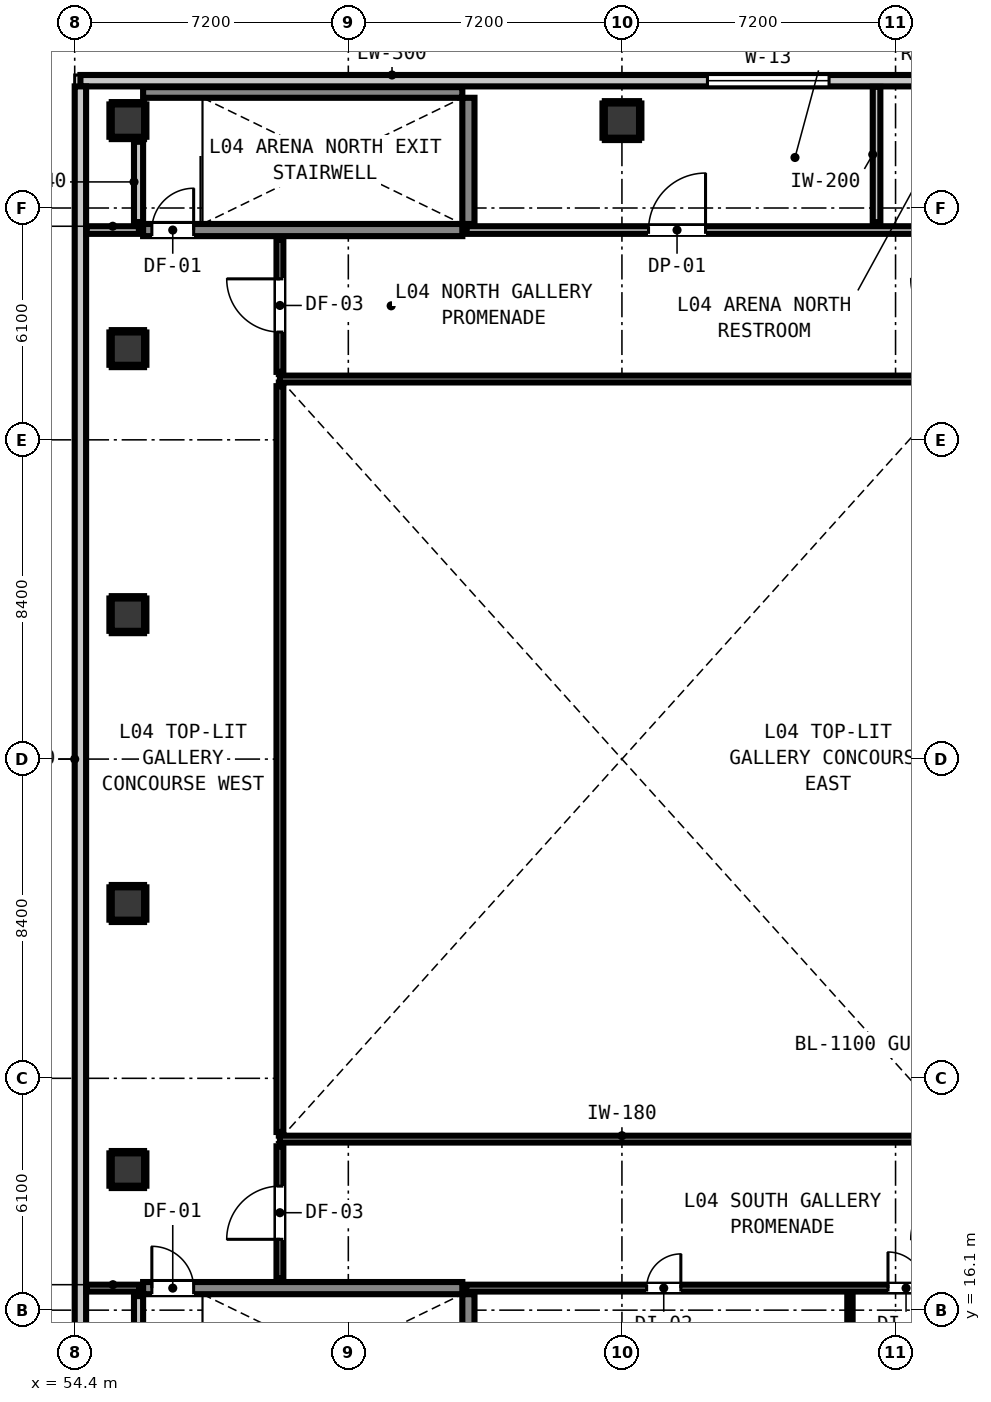
"""IFC4 building model, lengths in metres.
Left out: names, types, materials, properties, quantities, classifications, styles, units other than length and angle.
Written with IfcOpenShell. Run it as: python <this file> out.ifc"""

import sys

from ifc_helpers import new_model, si_unit, direction, frame, frame_2d, origin, origin_2d, place, context, subcontext, project, spatial, rectangle, circle, extrude, element, fill, save


model = new_model("IFC4")
c1 = context("Model", 3, precision=1e-05, world=origin(), true_north=direction((0.0, 1.0)))
c2 = subcontext(c1, "Body", "Model", "MODEL_VIEW")
j1 = project(units=[si_unit("LENGTHUNIT", "METRE"), si_unit("PLANEANGLEUNIT", "RADIAN")], contexts=[c1])
p1 = place(None, origin())
s1 = spatial("IfcSite", under=j1, at=p1, CompositionType="ELEMENT")
p2 = place(p1, origin())
s2 = spatial("IfcBuilding", under=s1, at=p2, CompositionType="ELEMENT")
p3 = place(p2, frame((0.0, 0.0, 17.8)))
s3 = spatial("IfcBuildingStorey", under=s2, at=p3, CompositionType="ELEMENT", Elevation=17.8)
p4 = place(p3, frame((64.76, 13.2, 0.0), z_axis=(0.0, 0.0, 1.0), x_axis=(0.0, 1.0, 0.0)))
e1 = element("IfcWall", 1, at=p4, inside=s3, PredefinedType="SHEAR", context=c2, shape_type="SweptSolid", body=[
    extrude(rectangle(XDim=3.32, YDim=0.32, at=frame_2d((1.66, 0.0))), origin(), (0.0, 0.0, 1.0), 4.2),
])
p5 = place(p3, frame((56.2, 16.68, 0.0), z_axis=(0.0, 0.0, 1.0), x_axis=(1.0, 0.0, 0.0)))
e2 = element("IfcWall", 2, at=p5, inside=s3, PredefinedType="SHEAR", context=c2, shape_type="SweptSolid", body=[
    extrude(rectangle(XDim=8.4, YDim=0.32, at=frame_2d((4.2, 0.0))), origin(), (0.0, 0.0, 1.0), 4.2),
])
p6 = place(p5, frame((0.23, 0.0, 0.0)))
e3 = element("IfcOpeningElement", 3, at=p6, cuts=e2, PredefinedType="OPENING", context=c2, shape_type="SweptSolid", body=[
    extrude(rectangle(XDim=1.1, YDim=2.15, at=frame_2d((0.55, 1.075))), frame((0.0, 0.17, 0.0), z_axis=(0.0, -1.0, 0.0), x_axis=(1.0, 0.0, 0.0)), (0.0, 0.0, 1.0), 0.34),
])
p7 = place(p3, frame((64.76, 44.68, 0.0), z_axis=(0.0, 0.0, 1.0), x_axis=(0.0, 1.0, 0.0)))
e4 = element("IfcWall", 4, at=p7, inside=s3, PredefinedType="SHEAR", context=c2, shape_type="SweptSolid", body=[
    extrude(rectangle(XDim=3.32, YDim=0.32, at=frame_2d((1.66, 0.0))), origin(), (0.0, 0.0, 1.0), 4.2),
])
p8 = place(p3, frame((56.2, 48.14, 0.0), z_axis=(0.0, 0.0, 1.0), x_axis=(1.0, 0.0, 0.0)))
e5 = element("IfcWall", 5, at=p8, inside=s3, PredefinedType="SHEAR", context=c2, shape_type="SweptSolid", body=[
    extrude(rectangle(XDim=8.4, YDim=0.28, at=frame_2d((4.2, 0.0))), origin(), (0.0, 0.0, 1.0), 4.2),
])
p9 = place(p3, frame((56.2, 44.52, 0.0), z_axis=(0.0, 0.0, 1.0), x_axis=(1.0, 0.0, 0.0)))
e6 = element("IfcWall", 6, at=p9, inside=s3, PredefinedType="SHEAR", context=c2, shape_type="SweptSolid", body=[
    extrude(rectangle(XDim=8.4, YDim=0.32, at=frame_2d((4.2, 0.0))), origin(), (0.0, 0.0, 1.0), 4.2),
])
p10 = place(p9, frame((0.23, 0.0, 0.0)))
e7 = element("IfcOpeningElement", 7, at=p10, cuts=e6, PredefinedType="OPENING", context=c2, shape_type="SweptSolid", body=[
    extrude(rectangle(XDim=1.1, YDim=2.15, at=frame_2d((0.55, 1.075))), frame((0.0, 0.17, 0.0), z_axis=(0.0, -1.0, 0.0), x_axis=(1.0, 0.0, 0.0)), (0.0, 0.0, 1.0), 0.34),
])
for number, where, z_axis, x_axis in (
    (8, (55.8, 19.8, 0.0), (0.0, 0.0, 1.0), (1.0, 0.0, 0.0)),
    (9, (55.8, 26.8, 0.0), (0.0, 0.0, 1.0), (1.0, 0.0, 0.0)),
    (10, (55.8, 34.4, 0.0), (0.0, 0.0, 1.0), (1.0, 0.0, 0.0)),
    (11, (55.8, 41.4, 0.0), (0.0, 0.0, 1.0), (1.0, 0.0, 0.0)),
    (12, (55.8, 47.4, 0.0), (0.0, 0.0, 1.0), (1.0, 0.0, 0.0)),
):
    element("IfcColumn", number, at=place(p3, frame(where, z_axis=z_axis, x_axis=x_axis)), inside=s3, PredefinedType="COLUMN", context=c2, shape_type="SweptSolid", body=[
        extrude(rectangle(XDim=0.85, YDim=0.85, at=origin_2d()), origin(), (0.0, 0.0, 1.0), 4.2),
    ])
p11 = place(p3, frame((68.8, 47.4, 0.0), z_axis=(0.0, 0.0, 1.0), x_axis=(1.0, 0.0, 0.0)))
e13 = element("IfcColumn", 13, at=p11, inside=s3, PredefinedType="COLUMN", context=c2, shape_type="SweptSolid", body=[
    extrude(circle(Radius=0.45, at=origin_2d()), origin(), (0.0, 0.0, 1.0), 4.2),
])
p12 = place(p3, frame((54.55, 48.45, 0.0), z_axis=(0.0, 0.0, 1.0), x_axis=(1.0, 0.0, 0.0)))
e14 = element("IfcWall", 14, at=p12, inside=s3, PredefinedType="STANDARD", context=c2, shape_type="SweptSolid", body=[
    extrude(rectangle(XDim=28.5, YDim=0.3, at=frame_2d((14.25, 0.0))), origin(), (0.0, 0.0, 1.0), 4.2),
])
p13 = place(p12, frame((16.5, 0.0, 1.6)))
e15 = element("IfcOpeningElement", 15, at=p13, cuts=e14, PredefinedType="OPENING", context=c2, shape_type="SweptSolid", body=[
    extrude(rectangle(XDim=3.2, YDim=1.4, at=frame_2d((1.6, 0.7))), frame((0.0, 0.16, 0.0), z_axis=(0.0, -1.0, 0.0), x_axis=(1.0, 0.0, 0.0)), (0.0, 0.0, 1.0), 0.32),
])
p14 = place(p3, frame((54.55, 12.9, 0.0), z_axis=(0.0, 0.0, 1.0), x_axis=(0.0, 1.0, 0.0)))
e16 = element("IfcWall", 16, at=p14, inside=s3, PredefinedType="STANDARD", context=c2, shape_type="SweptSolid", body=[
    extrude(rectangle(XDim=35.4, YDim=0.3, at=frame_2d((17.7, 0.0))), origin(), (0.0, 0.0, 1.0), 4.2),
])
for number, where, z_axis, x_axis in (
    (17, (56.08, 14.357, 0.0), (0.0, 0.0, 1.0), (0.0, 1.0, 0.0)),
    (18, (56.08, 44.73, 0.0), (0.0, 0.0, 1.0), (0.0, 1.0, 0.0)),
):
    element("IfcWall", number, at=place(p3, frame(where, z_axis=z_axis, x_axis=x_axis)), inside=s3, PredefinedType="PARTITIONING", context=c2, shape_type="SweptSolid", body=[
        extrude(rectangle(XDim=2.113, YDim=0.24, at=frame_2d((1.057, 0.0))), origin(), (0.0, 0.0, 1.0), 3.78),
    ])
p15 = place(p3, frame((54.712, 44.52, 0.0), z_axis=(0.0, 0.0, 1.0), x_axis=(1.0, 0.0, 0.0)))
e19 = element("IfcWall", 19, at=p15, inside=s3, PredefinedType="PARTITIONING", context=c2, shape_type="SweptSolid", body=[
    extrude(rectangle(XDim=1.378, YDim=0.2, at=frame_2d((0.689, 0.0))), origin(), (0.0, 0.0, 1.0), 3.78),
])
p16 = place(p3, frame((64.71, 44.52, 0.0), z_axis=(0.0, 0.0, 1.0), x_axis=(1.0, 0.0, 0.0)))
e20 = element("IfcWall", 20, at=p16, inside=s3, PredefinedType="PARTITIONING", context=c2, shape_type="SweptSolid", body=[
    extrude(rectangle(XDim=15.54, YDim=0.2, at=frame_2d((7.77, 0.0))), origin(), (0.0, 0.0, 1.0), 3.78),
])
p17 = place(p16, frame((4.79, 0.0, 0.0)))
e21 = element("IfcOpeningElement", 21, at=p17, cuts=e20, PredefinedType="OPENING", context=c2, shape_type="SweptSolid", body=[
    extrude(rectangle(XDim=1.5, YDim=2.15, at=frame_2d((0.75, 1.075))), frame((0.0, 0.11, 0.0), z_axis=(0.0, -1.0, 0.0), x_axis=(1.0, 0.0, 0.0)), (0.0, 0.0, 1.0), 0.22),
])
p18 = place(p16, frame((13.871, 0.0, 0.0)))
e22 = element("IfcOpeningElement", 22, at=p18, cuts=e20, PredefinedType="OPENING", context=c2, shape_type="SweptSolid", body=[
    extrude(rectangle(XDim=0.86, YDim=2.02, at=frame_2d((0.43, 1.01))), frame((0.0, 0.11, 0.0), z_axis=(0.0, -1.0, 0.0), x_axis=(1.0, 0.0, 0.0)), (0.0, 0.0, 1.0), 0.22),
])
p19 = place(p3, frame((54.712, 16.68, 0.0), z_axis=(0.0, 0.0, 1.0), x_axis=(1.0, 0.0, 0.0)))
e23 = element("IfcWall", 23, at=p19, inside=s3, PredefinedType="PARTITIONING", context=c2, shape_type="SweptSolid", body=[
    extrude(rectangle(XDim=1.388, YDim=0.18, at=frame_2d((0.694, 0.0))), origin(), (0.0, 0.0, 1.0), 3.78),
])
p20 = place(p3, frame((64.7, 16.68, 0.0), z_axis=(0.0, 0.0, 1.0), x_axis=(1.0, 0.0, 0.0)))
e24 = element("IfcWall", 24, at=p20, inside=s3, PredefinedType="PARTITIONING", context=c2, shape_type="SweptSolid", body=[
    extrude(rectangle(XDim=15.482, YDim=0.18, at=frame_2d((7.741, 0.0))), origin(), (0.0, 0.0, 1.0), 3.78),
])
p21 = place(p20, frame((13.625, 0.0, 0.0)))
e25 = element("IfcOpeningElement", 25, at=p21, cuts=e24, PredefinedType="OPENING", context=c2, shape_type="SweptSolid", body=[
    extrude(rectangle(XDim=1.4, YDim=2.15, at=frame_2d((0.7, 1.075))), frame((0.0, 0.1, 0.0), z_axis=(0.0, -1.0, 0.0), x_axis=(1.0, 0.0, 0.0)), (0.0, 0.0, 1.0), 0.2),
])
p22 = place(p20, frame((4.75, 0.0, 0.0)))
e26 = element("IfcOpeningElement", 26, at=p22, cuts=e24, PredefinedType="OPENING", context=c2, shape_type="SweptSolid", body=[
    extrude(rectangle(XDim=0.9, YDim=2.1, at=frame_2d((0.45, 1.05))), frame((0.0, 0.1, 0.0), z_axis=(0.0, -1.0, 0.0), x_axis=(1.0, 0.0, 0.0)), (0.0, 0.0, 1.0), 0.2),
])
p23 = place(p20, frame((11.101, 0.0, 0.0)))
e27 = element("IfcOpeningElement", 27, at=p23, cuts=e24, PredefinedType="OPENING", context=c2, shape_type="SweptSolid", body=[
    extrude(rectangle(XDim=0.95, YDim=2.1, at=frame_2d((0.475, 1.05))), frame((0.0, 0.1, 0.0), z_axis=(0.0, -1.0, 0.0), x_axis=(1.0, 0.0, 0.0)), (0.0, 0.0, 1.0), 0.2),
])
for number, where, z_axis, x_axis in (
    (28, (59.8, 20.6, 0.0), (0.0, 0.0, 1.0), (1.0, 0.0, 0.0)),
    (29, (59.8, 40.6, 0.0), (0.0, 0.0, 1.0), (1.0, 0.0, 0.0)),
):
    element("IfcWall", number, at=place(p3, frame(where, z_axis=z_axis, x_axis=x_axis)), inside=s3, PredefinedType="PARTITIONING", context=c2, shape_type="SweptSolid", body=[
        extrude(rectangle(XDim=18.0, YDim=0.18, at=frame_2d((9.0, 0.0))), origin(), (0.0, 0.0, 1.0), 3.78),
    ])
p24 = place(p3, frame((75.5, 44.728, 0.0), z_axis=(0.0, 0.0, 1.0), x_axis=(0.0, 1.0, 0.0)))
e30 = element("IfcWall", 30, at=p24, inside=s3, PredefinedType="PARTITIONING", context=c2, shape_type="SweptSolid", body=[
    extrude(rectangle(XDim=3.56, YDim=0.2, at=frame_2d((1.78, 0.0))), origin(), (0.0, 0.0, 1.0), 3.78),
])
p25 = place(p3, frame((59.8, 16.94, 0.0), z_axis=(0.0, 0.0, 1.0), x_axis=(0.0, 1.0, 0.0)))
e31 = element("IfcWall", 31, at=p25, inside=s3, PredefinedType="PARTITIONING", context=c2, shape_type="SweptSolid", body=[
    extrude(rectangle(XDim=3.472, YDim=0.18, at=frame_2d((1.736, 0.0))), origin(), (0.0, 0.0, 1.0), 3.78),
])
p26 = place(p25, frame((1.024, 0.0, 0.0)))
e32 = element("IfcOpeningElement", 32, at=p26, cuts=e31, PredefinedType="OPENING", context=c2, shape_type="SweptSolid", body=[
    extrude(rectangle(XDim=1.4, YDim=2.15, at=frame_2d((0.7, 1.075))), frame((0.0, 0.1, 0.0), z_axis=(0.0, -1.0, 0.0), x_axis=(1.0, 0.0, 0.0)), (0.0, 0.0, 1.0), 0.2),
])
p27 = place(p3, frame((59.8, 20.788, 0.0), z_axis=(0.0, 0.0, 1.0), x_axis=(0.0, 1.0, 0.0)))
e33 = element("IfcWall", 33, at=p27, inside=s3, PredefinedType="PARTITIONING", context=c2, shape_type="SweptSolid", body=[
    extrude(rectangle(XDim=19.624, YDim=0.18, at=frame_2d((9.812, 0.0))), origin(), (0.0, 0.0, 1.0), 3.78),
])
p28 = place(p3, frame((59.8, 40.788, 0.0), z_axis=(0.0, 0.0, 1.0), x_axis=(0.0, 1.0, 0.0)))
e34 = element("IfcWall", 34, at=p28, inside=s3, PredefinedType="PARTITIONING", context=c2, shape_type="SweptSolid", body=[
    extrude(rectangle(XDim=3.472, YDim=0.18, at=frame_2d((1.736, 0.0))), origin(), (0.0, 0.0, 1.0), 3.78),
])
p29 = place(p28, frame((1.048, 0.0, 0.0)))
e35 = element("IfcOpeningElement", 35, at=p29, cuts=e34, PredefinedType="OPENING", context=c2, shape_type="SweptSolid", body=[
    extrude(rectangle(XDim=1.4, YDim=2.15, at=frame_2d((0.7, 1.075))), frame((0.0, 0.1, 0.0), z_axis=(0.0, -1.0, 0.0), x_axis=(1.0, 0.0, 0.0)), (0.0, 0.0, 1.0), 0.2),
])
p30 = place(p3, frame((74.8, 12.912, 0.0), z_axis=(0.0, 0.0, 1.0), x_axis=(0.0, 1.0, 0.0)))
e36 = element("IfcWall", 36, at=p30, inside=s3, PredefinedType="PARTITIONING", context=c2, shape_type="SweptSolid", body=[
    extrude(rectangle(XDim=3.6, YDim=0.14, at=frame_2d((1.8, 0.0))), origin(), (0.0, 0.0, 1.0), 3.78),
])
for number, where, z_axis, x_axis in (
    (37, (55.375, 19.343, 0.0), (0.0, 0.0, 1.0), (1.0, 0.0, 0.0)),
    (38, (55.375, 20.257, 0.0), (0.0, 0.0, 1.0), (1.0, 0.0, 0.0)),
    (39, (55.343, 19.375, 0.0), (0.0, 0.0, 1.0), (0.0, 1.0, 0.0)),
    (40, (56.257, 19.375, 0.0), (0.0, 0.0, 1.0), (0.0, 1.0, 0.0)),
    (41, (55.375, 26.343, 0.0), (0.0, 0.0, 1.0), (1.0, 0.0, 0.0)),
    (42, (55.375, 27.257, 0.0), (0.0, 0.0, 1.0), (1.0, 0.0, 0.0)),
    (43, (55.343, 26.375, 0.0), (0.0, 0.0, 1.0), (0.0, 1.0, 0.0)),
    (44, (56.257, 26.375, 0.0), (0.0, 0.0, 1.0), (0.0, 1.0, 0.0)),
    (45, (55.375, 33.943, 0.0), (0.0, 0.0, 1.0), (1.0, 0.0, 0.0)),
    (46, (55.375, 34.857, 0.0), (0.0, 0.0, 1.0), (1.0, 0.0, 0.0)),
):
    element("IfcWall", number, at=place(p3, frame(where, z_axis=z_axis, x_axis=x_axis)), inside=s3, PredefinedType="PARTITIONING", context=c2, shape_type="SweptSolid", body=[
        extrude(rectangle(XDim=0.85, YDim=0.06, at=frame_2d((0.425, 0.0))), origin(), (0.0, 0.0, 1.0), 1.45),
    ])
for number, where, z_axis, x_axis in (
    (47, (55.343, 33.975, 0.0), (0.0, 0.0, 1.0), (0.0, 1.0, 0.0)),
    (48, (56.257, 33.975, 0.0), (0.0, 0.0, 1.0), (0.0, 1.0, 0.0)),
):
    element("IfcWall", number, at=place(p3, frame(where, z_axis=z_axis, x_axis=x_axis)), inside=s3, PredefinedType="PARTITIONING", context=c2, shape_type="SweptSolid", body=[
        extrude(rectangle(XDim=0.85, YDim=0.06, at=frame_2d((0.425, 0.0))), origin(), (0.0, 0.0, 1.0), 1.45),
    ])
for number, where, z_axis, x_axis in (
    (49, (55.375, 40.943, 0.0), (0.0, 0.0, 1.0), (1.0, 0.0, 0.0)),
    (50, (55.375, 41.857, 0.0), (0.0, 0.0, 1.0), (1.0, 0.0, 0.0)),
):
    element("IfcWall", number, at=place(p3, frame(where, z_axis=z_axis, x_axis=x_axis)), inside=s3, PredefinedType="PARTITIONING", context=c2, shape_type="SweptSolid", body=[
        extrude(rectangle(XDim=0.85, YDim=0.06, at=frame_2d((0.425, 0.0))), origin(), (0.0, 0.0, 1.0), 1.45),
    ])
for number, where, z_axis, x_axis in (
    (51, (55.343, 40.975, 0.0), (0.0, 0.0, 1.0), (0.0, 1.0, 0.0)),
    (52, (56.257, 40.975, 0.0), (0.0, 0.0, 1.0), (0.0, 1.0, 0.0)),
):
    element("IfcWall", number, at=place(p3, frame(where, z_axis=z_axis, x_axis=x_axis)), inside=s3, PredefinedType="PARTITIONING", context=c2, shape_type="SweptSolid", body=[
        extrude(rectangle(XDim=0.85, YDim=0.06, at=frame_2d((0.425, 0.0))), origin(), (0.0, 0.0, 1.0), 1.45),
    ])
for number, where, z_axis, x_axis in (
    (53, (55.375, 46.943, 0.0), (0.0, 0.0, 1.0), (1.0, 0.0, 0.0)),
    (54, (55.375, 47.857, 0.0), (0.0, 0.0, 1.0), (1.0, 0.0, 0.0)),
):
    element("IfcWall", number, at=place(p3, frame(where, z_axis=z_axis, x_axis=x_axis)), inside=s3, PredefinedType="PARTITIONING", context=c2, shape_type="SweptSolid", body=[
        extrude(rectangle(XDim=0.85, YDim=0.06, at=frame_2d((0.425, 0.0))), origin(), (0.0, 0.0, 1.0), 1.45),
    ])
for number, where, z_axis, x_axis in (
    (55, (55.343, 46.975, 0.0), (0.0, 0.0, 1.0), (0.0, 1.0, 0.0)),
    (56, (56.257, 46.975, 0.0), (0.0, 0.0, 1.0), (0.0, 1.0, 0.0)),
):
    element("IfcWall", number, at=place(p3, frame(where, z_axis=z_axis, x_axis=x_axis)), inside=s3, PredefinedType="PARTITIONING", context=c2, shape_type="SweptSolid", body=[
        extrude(rectangle(XDim=0.85, YDim=0.06, at=frame_2d((0.425, 0.0))), origin(), (0.0, 0.0, 1.0), 1.45),
    ])
for number, where, z_axis, x_axis in (
    (57, (68.35, 46.918, 0.0), (0.0, 0.0, 1.0), (1.0, 0.0, 0.0)),
    (58, (68.35, 47.882, 0.0), (0.0, 0.0, 1.0), (1.0, 0.0, 0.0)),
):
    element("IfcWall", number, at=place(p3, frame(where, z_axis=z_axis, x_axis=x_axis)), inside=s3, PredefinedType="PARTITIONING", context=c2, shape_type="SweptSolid", body=[
        extrude(rectangle(XDim=0.9, YDim=0.06, at=frame_2d((0.45, 0.0))), origin(), (0.0, 0.0, 1.0), 1.45),
    ])
for number, where, z_axis, x_axis in (
    (59, (68.318, 46.95, 0.0), (0.0, 0.0, 1.0), (0.0, 1.0, 0.0)),
    (60, (69.282, 46.95, 0.0), (0.0, 0.0, 1.0), (0.0, 1.0, 0.0)),
):
    element("IfcWall", number, at=place(p3, frame(where, z_axis=z_axis, x_axis=x_axis)), inside=s3, PredefinedType="PARTITIONING", context=c2, shape_type="SweptSolid", body=[
        extrude(rectangle(XDim=0.9, YDim=0.06, at=frame_2d((0.45, 0.0))), origin(), (0.0, 0.0, 1.0), 1.45),
    ])
p31 = place(p13, origin())
e61 = element("IfcWindow", 61, at=p31, inside=s3, PartitioningType="SINGLE_PANEL", PredefinedType="LIGHTDOME", context=c2, shape_type="SweptSolid", body=[
    extrude(rectangle(XDim=3.2, YDim=1.4, at=frame_2d((1.6, 0.7))), frame((0.0, 0.03, 0.0), z_axis=(0.0, -1.0, 0.0), x_axis=(1.0, 0.0, 0.0)), (0.0, 0.0, 1.0), 0.06),
])
fill(e15, e61)
p32 = place(p6, origin())
e62 = element("IfcDoor", 62, at=p32, inside=s3, OperationType="SINGLE_SWING_LEFT", PredefinedType="DOOR", context=c2, shape_type="SweptSolid", body=[
    extrude(rectangle(XDim=1.1, YDim=2.15, at=frame_2d((0.55, 1.075))), frame((0.0, 0.025, 0.0), z_axis=(0.0, -1.0, 0.0), x_axis=(1.0, 0.0, 0.0)), (0.0, 0.0, 1.0), 0.05),
])
fill(e3, e62)
p33 = place(p10, origin())
e63 = element("IfcDoor", 63, at=p33, inside=s3, OperationType="SINGLE_SWING_RIGHT", PredefinedType="DOOR", context=c2, shape_type="SweptSolid", body=[
    extrude(rectangle(XDim=1.1, YDim=2.15, at=frame_2d((0.55, 1.075))), frame((0.0, 0.025, 0.0), z_axis=(0.0, -1.0, 0.0), x_axis=(1.0, 0.0, 0.0)), (0.0, 0.0, 1.0), 0.05),
])
fill(e7, e63)
p34 = place(p26, origin())
e64 = element("IfcDoor", 64, at=p34, inside=s3, OperationType="SINGLE_SWING_LEFT", PredefinedType="DOOR", context=c2, shape_type="SweptSolid", body=[
    extrude(rectangle(XDim=1.4, YDim=2.15, at=frame_2d((0.7, 1.075))), frame((0.0, 0.025, 0.0), z_axis=(0.0, -1.0, 0.0), x_axis=(1.0, 0.0, 0.0)), (0.0, 0.0, 1.0), 0.05),
])
fill(e32, e64)
p35 = place(p29, origin())
e65 = element("IfcDoor", 65, at=p35, inside=s3, OperationType="SINGLE_SWING_RIGHT", PredefinedType="DOOR", context=c2, shape_type="SweptSolid", body=[
    extrude(rectangle(XDim=1.4, YDim=2.15, at=frame_2d((0.7, 1.075))), frame((0.0, 0.025, 0.0), z_axis=(0.0, -1.0, 0.0), x_axis=(1.0, 0.0, 0.0)), (0.0, 0.0, 1.0), 0.05),
])
fill(e35, e65)
p36 = place(p22, origin())
e66 = element("IfcDoor", 66, at=p36, inside=s3, OperationType="SINGLE_SWING_RIGHT", PredefinedType="DOOR", context=c2, shape_type="SweptSolid", body=[
    extrude(rectangle(XDim=0.9, YDim=2.1, at=frame_2d((0.45, 1.05))), frame((0.0, 0.025, 0.0), z_axis=(0.0, -1.0, 0.0), x_axis=(1.0, 0.0, 0.0)), (0.0, 0.0, 1.0), 0.05),
])
fill(e26, e66)
p37 = place(p23, origin())
e67 = element("IfcDoor", 67, at=p37, inside=s3, OperationType="SINGLE_SWING_LEFT", PredefinedType="DOOR", context=c2, shape_type="SweptSolid", body=[
    extrude(rectangle(XDim=0.95, YDim=2.1, at=frame_2d((0.475, 1.05))), frame((0.0, 0.025, 0.0), z_axis=(0.0, -1.0, 0.0), x_axis=(1.0, 0.0, 0.0)), (0.0, 0.0, 1.0), 0.05),
])
fill(e27, e67)
p38 = place(p17, origin())
e68 = element("IfcDoor", 68, at=p38, inside=s3, OperationType="SINGLE_SWING_RIGHT", PredefinedType="DOOR", context=c2, shape_type="SweptSolid", body=[
    extrude(rectangle(XDim=1.5, YDim=2.15, at=frame_2d((0.75, 1.075))), frame((0.0, 0.025, 0.0), z_axis=(0.0, -1.0, 0.0), x_axis=(1.0, 0.0, 0.0)), (0.0, 0.0, 1.0), 0.05),
])
fill(e21, e68)
save(model, sys.argv[1])
